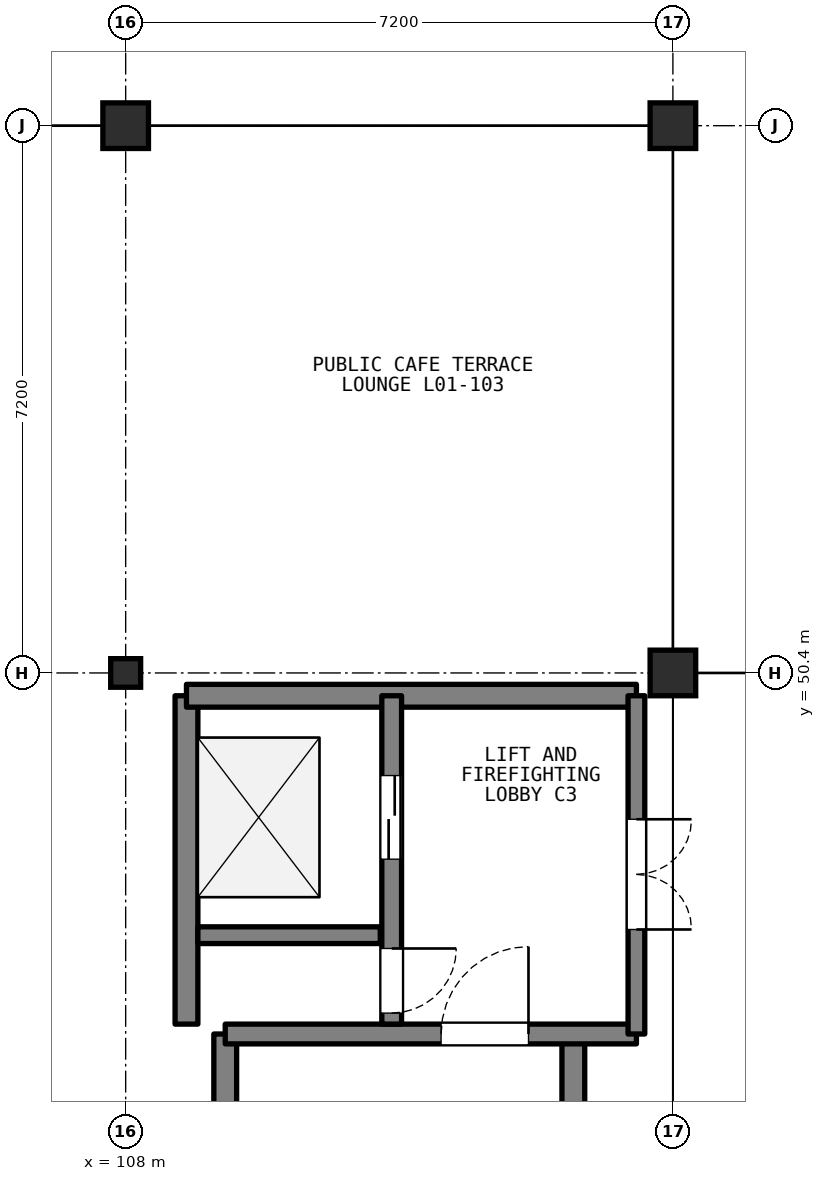
"""IFC4 building model, lengths in metres.
Left out: names, types, materials, properties, quantities, classifications, styles, units other than length and angle.
Written with IfcOpenShell. Run it as: python <this file> out.ifc"""

import sys

from ifc_helpers import new_model, si_unit, direction, frame, frame_2d, origin, origin_2d, place, context, subcontext, project, spatial, rectangle, i_section, extrude, element, fill, save


model = new_model("IFC4")
c1 = context("Model", 3, precision=1e-05, world=origin(), true_north=direction((0.0, 1.0)))
c2 = subcontext(c1, "Body", "Model", "MODEL_VIEW")
j1 = project(units=[si_unit("LENGTHUNIT", "METRE"), si_unit("PLANEANGLEUNIT", "RADIAN")], contexts=[c1])
p1 = place(None, origin())
s1 = spatial("IfcSite", under=j1, at=p1, CompositionType="ELEMENT")
p2 = place(p1, origin())
s2 = spatial("IfcBuilding", under=s1, at=p2, CompositionType="ELEMENT")
p3 = place(p2, origin())
s3 = spatial("IfcBuildingStorey", under=s2, at=p3, CompositionType="ELEMENT", Elevation=0.0)
p4 = place(p3, frame((108.0, 50.4, 0.0), z_axis=(0.0, 0.0, 1.0), x_axis=(1.0, 0.0, 0.0)))
e1 = element("IfcColumn", 1, at=p4, inside=s3, PredefinedType="COLUMN", context=c2, shape_type="SweptSolid", body=[
    extrude(i_section(OverallWidth=0.394, OverallDepth=0.376, WebThickness=0.017, FlangeThickness=0.028, FilletRadius=0.015, at=origin_2d()), origin(), (0.0, 0.0, 1.0), 5.4),
])
for number, where, z_axis, x_axis in (
    (2, (108.0, 57.6, 0.0), (0.0, 0.0, 1.0), (1.0, 0.0, 0.0)),
    (3, (115.2, 50.4, 0.0), (0.0, 0.0, 1.0), (1.0, 0.0, 0.0)),
    (4, (115.2, 57.6, 0.0), (0.0, 0.0, 1.0), (1.0, 0.0, 0.0)),
):
    element("IfcColumn", number, at=place(p3, frame(where, z_axis=z_axis, x_axis=x_axis)), inside=s3, PredefinedType="COLUMN", context=c2, shape_type="SweptSolid", body=[
        extrude(rectangle(XDim=0.6, YDim=0.6, at=origin_2d()), origin(), (0.0, 0.0, 1.0), 5.4),
    ])
for number, where, z_axis, x_axis in (
    (5, (109.31, 36.35, 0.0), (0.0, 0.0, 1.0), (0.0, 1.0, 0.0)),
    (6, (113.89, 36.35, 0.0), (0.0, 0.0, 1.0), (0.0, 1.0, 0.0)),
):
    element("IfcWall", number, at=place(p3, frame(where, z_axis=z_axis, x_axis=x_axis)), inside=s3, PredefinedType="SHEAR", context=c2, shape_type="SweptSolid", body=[
        extrude(rectangle(XDim=9.3, YDim=0.3, at=frame_2d((4.65, 0.0))), origin(), (0.0, 0.0, 1.0), 5.2),
    ])
p5 = place(p3, frame((109.31, 45.65, 0.0), z_axis=(0.0, 0.0, 1.0), x_axis=(1.0, 0.0, 0.0)))
e7 = element("IfcWall", 7, at=p5, inside=s3, PredefinedType="SHEAR", context=c2, shape_type="SweptSolid", body=[
    extrude(rectangle(XDim=5.41, YDim=0.26, at=frame_2d((2.705, 0.0))), origin(), (0.0, 0.0, 1.0), 5.2),
])
p6 = place(p5, frame((2.84, 0.0, 0.0)))
e8 = element("IfcOpeningElement", 8, at=p6, cuts=e7, PredefinedType="OPENING", context=c2, shape_type="SweptSolid", body=[
    extrude(rectangle(XDim=1.15, YDim=2.15, at=frame_2d((0.575, 1.075))), frame((0.0, 0.14, 0.0), z_axis=(0.0, -1.0, 0.0), x_axis=(1.0, 0.0, 0.0)), (0.0, 0.0, 1.0), 0.28),
])
p7 = place(p3, frame((108.8, 45.78, 0.0), z_axis=(0.0, 0.0, 1.0), x_axis=(0.0, 1.0, 0.0)))
e9 = element("IfcWall", 9, at=p7, inside=s3, PredefinedType="SHEAR", context=c2, shape_type="SweptSolid", body=[
    extrude(rectangle(XDim=4.32, YDim=0.3, at=frame_2d((2.16, 0.0))), origin(), (0.0, 0.0, 1.0), 5.2),
])
p8 = place(p3, frame((108.8, 50.1, 0.0), z_axis=(0.0, 0.0, 1.0), x_axis=(1.0, 0.0, 0.0)))
e10 = element("IfcWall", 10, at=p8, inside=s3, PredefinedType="SHEAR", context=c2, shape_type="SweptSolid", body=[
    extrude(rectangle(XDim=5.92, YDim=0.3, at=frame_2d((2.96, 0.0))), origin(), (0.0, 0.0, 1.0), 5.2),
])
p9 = place(p3, frame((108.95, 46.95, 0.0), z_axis=(0.0, 0.0, 1.0), x_axis=(1.0, 0.0, 0.0)))
e11 = element("IfcWall", 11, at=p9, inside=s3, PredefinedType="SHEAR", context=c2, shape_type="SweptSolid", body=[
    extrude(rectangle(XDim=2.4, YDim=0.22, at=frame_2d((1.2, 0.0))), origin(), (0.0, 0.0, 1.0), 5.2),
])
p10 = place(p3, frame((111.5, 50.1, 0.0), z_axis=(0.0, 0.0, 1.0), x_axis=(0.0, -1.0, 0.0)))
e12 = element("IfcWall", 12, at=p10, inside=s3, PredefinedType="SHEAR", context=c2, shape_type="SweptSolid", body=[
    extrude(rectangle(XDim=4.32, YDim=0.26, at=frame_2d((2.16, 0.0))), origin(), (0.0, 0.0, 1.0), 5.2),
])
p11 = place(p10, frame((1.05, 0.0, 0.0)))
e13 = element("IfcOpeningElement", 13, at=p11, cuts=e12, PredefinedType="OPENING", context=c2, shape_type="SweptSolid", body=[
    extrude(rectangle(XDim=1.1, YDim=2.15, at=frame_2d((0.55, 1.075))), frame((0.0, 0.14, 0.0), z_axis=(0.0, -1.0, 0.0), x_axis=(1.0, 0.0, 0.0)), (0.0, 0.0, 1.0), 0.28),
])
p12 = place(p10, frame((3.325, 0.0, 0.0)))
e14 = element("IfcOpeningElement", 14, at=p12, cuts=e12, PredefinedType="OPENING", context=c2, shape_type="SweptSolid", body=[
    extrude(rectangle(XDim=0.85, YDim=2.05, at=frame_2d((0.425, 1.025))), frame((0.0, 0.14, 0.0), z_axis=(0.0, -1.0, 0.0), x_axis=(1.0, 0.0, 0.0)), (0.0, 0.0, 1.0), 0.28),
])
p13 = place(p3, frame((114.72, 50.1, 0.0), z_axis=(0.0, 0.0, 1.0), x_axis=(0.0, -1.0, 0.0)))
e15 = element("IfcWall", 15, at=p13, inside=s3, PredefinedType="SHEAR", context=c2, shape_type="SweptSolid", body=[
    extrude(rectangle(XDim=4.45, YDim=0.22, at=frame_2d((2.225, 0.0))), origin(), (0.0, 0.0, 1.0), 5.2),
])
p14 = place(p13, frame((1.625, 0.0, 0.0)))
e16 = element("IfcOpeningElement", 16, at=p14, cuts=e15, PredefinedType="OPENING", context=c2, shape_type="SweptSolid", body=[
    extrude(rectangle(XDim=1.45, YDim=2.2, at=frame_2d((0.725, 1.1))), frame((0.0, 0.12, 0.0), z_axis=(0.0, -1.0, 0.0), x_axis=(1.0, 0.0, 0.0)), (0.0, 0.0, 1.0), 0.24),
])
p15 = place(p6, origin())
e17 = element("IfcDoor", 17, at=p15, inside=s3, OperationType="SINGLE_SWING_RIGHT", PredefinedType="DOOR", context=c2, shape_type="SweptSolid", body=[
    extrude(rectangle(XDim=1.15, YDim=2.15, at=frame_2d((0.575, 1.075))), frame((0.0, 0.025, 0.0), z_axis=(0.0, -1.0, 0.0), x_axis=(1.0, 0.0, 0.0)), (0.0, 0.0, 1.0), 0.05),
])
fill(e8, e17)
p16 = place(p11, origin())
e18 = element("IfcDoor", 18, at=p16, inside=s3, OperationType="DOUBLE_DOOR_SLIDING", PredefinedType="DOOR", context=c2, shape_type="SweptSolid", body=[
    extrude(rectangle(XDim=1.1, YDim=2.15, at=frame_2d((0.55, 1.075))), frame((0.0, 0.025, 0.0), z_axis=(0.0, -1.0, 0.0), x_axis=(1.0, 0.0, 0.0)), (0.0, 0.0, 1.0), 0.05),
])
fill(e13, e18)
p17 = place(p12, origin())
e19 = element("IfcDoor", 19, at=p17, inside=s3, OperationType="SINGLE_SWING_LEFT", PredefinedType="DOOR", context=c2, shape_type="SweptSolid", body=[
    extrude(rectangle(XDim=0.85, YDim=2.05, at=frame_2d((0.425, 1.025))), frame((0.0, 0.025, 0.0), z_axis=(0.0, -1.0, 0.0), x_axis=(1.0, 0.0, 0.0)), (0.0, 0.0, 1.0), 0.05),
])
fill(e14, e19)
p18 = place(p14, origin())
e20 = element("IfcDoor", 20, at=p18, inside=s3, OperationType="DOUBLE_DOOR_SINGLE_SWING", PredefinedType="DOOR", context=c2, shape_type="SweptSolid", body=[
    extrude(rectangle(XDim=1.45, YDim=2.2, at=frame_2d((0.725, 1.1))), frame((0.0, 0.025, 0.0), z_axis=(0.0, -1.0, 0.0), x_axis=(1.0, 0.0, 0.0)), (0.0, 0.0, 1.0), 0.05),
])
fill(e16, e20)
save(model, sys.argv[1])
